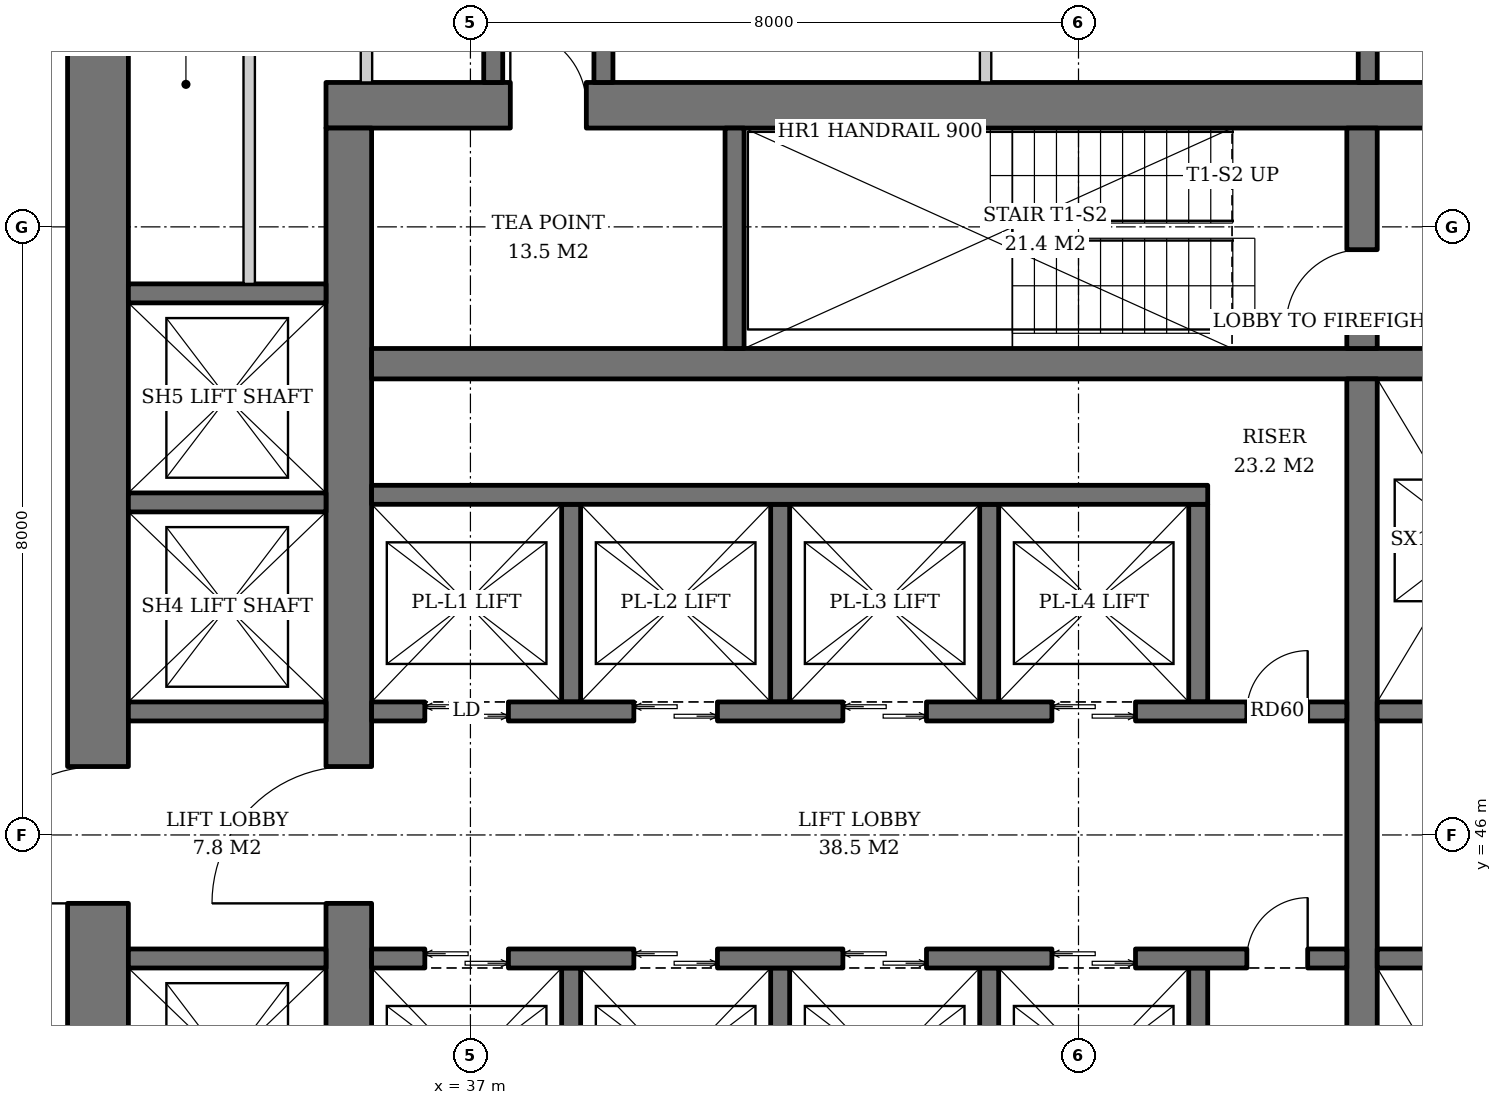
"""IFC4 building model, lengths in metres.
Left out: names, types, materials, properties, quantities, classifications, styles, units other than length and angle.
Written with IfcOpenShell. Run it as: python <this file> out.ifc"""

import sys

from ifc_helpers import new_model, si_unit, direction, frame, frame_2d, origin, place, context, subcontext, project, spatial, rectangle, extrude, element, fill, save


model = new_model("IFC4")
c1 = context("Model", 3, precision=1e-05, world=origin(), true_north=direction((0.0, 1.0)))
c2 = subcontext(c1, "Body", "Model", "MODEL_VIEW")
j1 = project(units=[si_unit("LENGTHUNIT", "METRE"), si_unit("PLANEANGLEUNIT", "RADIAN")], contexts=[c1])
p1 = place(None, origin())
s1 = spatial("IfcSite", under=j1, at=p1, CompositionType="ELEMENT")
p2 = place(p1, origin())
s2 = spatial("IfcBuilding", under=s1, at=p2, CompositionType="ELEMENT")
p3 = place(p2, frame((0.0, 0.0, 32.4)))
s3 = spatial("IfcBuildingStorey", under=s2, at=p3, CompositionType="ELEMENT", Elevation=32.4)
p4 = place(p3, frame((35.1, 55.6, 0.0), z_axis=(0.0, 0.0, 1.0), x_axis=(1.0, 0.0, 0.0)))
e1 = element("IfcWall", 1, at=p4, inside=s3, PredefinedType="SHEAR", context=c2, shape_type="SweptSolid", body=[
    extrude(rectangle(XDim=19.8, YDim=0.6, at=frame_2d((9.9, 0.0))), origin(), (0.0, 0.0, 1.0), 3.8),
])
p5 = place(p4, frame((14.54, 0.0, 0.0)))
e2 = element("IfcOpeningElement", 2, at=p5, cuts=e1, PredefinedType="OPENING", context=c2, shape_type="SweptSolid", body=[
    extrude(rectangle(XDim=1.0, YDim=2.1, at=frame_2d((0.5, 1.05))), frame((0.0, 0.31, 0.0), z_axis=(0.0, -1.0, 0.0), x_axis=(1.0, 0.0, 0.0)), (0.0, 0.0, 1.0), 0.62),
])
p6 = place(p4, frame((2.425, 0.0, 0.0)))
e3 = element("IfcOpeningElement", 3, at=p6, cuts=e1, PredefinedType="OPENING", context=c2, shape_type="SweptSolid", body=[
    extrude(rectangle(XDim=1.0, YDim=2.1, at=frame_2d((0.5, 1.05))), frame((0.0, 0.31, 0.0), z_axis=(0.0, -1.0, 0.0), x_axis=(1.0, 0.0, 0.0)), (0.0, 0.0, 1.0), 0.62),
])
p7 = place(p3, frame((35.4, 36.7, 0.0), z_axis=(0.0, 0.0, 1.0), x_axis=(0.0, 1.0, 0.0)))
e4 = element("IfcWall", 4, at=p7, inside=s3, PredefinedType="SHEAR", context=c2, shape_type="SweptSolid", body=[
    extrude(rectangle(XDim=18.6, YDim=0.6, at=frame_2d((9.3, 0.0))), origin(), (0.0, 0.0, 1.0), 3.8),
])
p8 = place(p7, frame((8.4, 0.0, 0.0)))
e5 = element("IfcOpeningElement", 5, at=p8, cuts=e4, PredefinedType="OPENING", context=c2, shape_type="SweptSolid", body=[
    extrude(rectangle(XDim=1.8, YDim=2.4, at=frame_2d((0.9, 1.2))), frame((0.0, 0.31, 0.0), z_axis=(0.0, -1.0, 0.0), x_axis=(1.0, 0.0, 0.0)), (0.0, 0.0, 1.0), 0.62),
])
p9 = place(p3, frame((32.1, 33.5, 0.0), z_axis=(0.0, 0.0, 1.0), x_axis=(0.0, 1.0, 0.0)))
e6 = element("IfcWall", 6, at=p9, inside=s3, PredefinedType="SHEAR", context=c2, shape_type="SweptSolid", body=[
    extrude(rectangle(XDim=25.0, YDim=0.8, at=frame_2d((12.5, 0.0))), origin(), (0.0, 0.0, 1.0), 3.8),
])
p10 = place(p9, frame((11.6, 0.0, 0.0)))
e7 = element("IfcOpeningElement", 7, at=p10, cuts=e6, PredefinedType="OPENING", context=c2, shape_type="SweptSolid", body=[
    extrude(rectangle(XDim=1.8, YDim=2.4, at=frame_2d((0.9, 1.2))), frame((0.0, 0.41, 0.0), z_axis=(0.0, -1.0, 0.0), x_axis=(1.0, 0.0, 0.0)), (0.0, 0.0, 1.0), 0.82),
])
p11 = place(p3, frame((35.7, 52.2, 0.0), z_axis=(0.0, 0.0, 1.0), x_axis=(1.0, 0.0, 0.0)))
e8 = element("IfcWall", 8, at=p11, inside=s3, PredefinedType="SHEAR", context=c2, shape_type="SweptSolid", body=[
    extrude(rectangle(XDim=18.6, YDim=0.4, at=frame_2d((9.3, 0.0))), origin(), (0.0, 0.0, 1.0), 3.8),
])
p12 = place(p3, frame((48.73, 40.0, 0.0), z_axis=(0.0, 0.0, 1.0), x_axis=(0.0, 1.0, 0.0)))
e9 = element("IfcWall", 9, at=p12, inside=s3, PredefinedType="SHEAR", context=c2, shape_type="SweptSolid", body=[
    extrude(rectangle(XDim=12.0, YDim=0.4, at=frame_2d((6.0, 0.0))), origin(), (0.0, 0.0, 1.0), 3.8),
])
p13 = place(p3, frame((48.73, 52.4, 0.0), z_axis=(0.0, 0.0, 1.0), x_axis=(0.0, 1.0, 0.0)))
e10 = element("IfcWall", 10, at=p13, inside=s3, PredefinedType="SHEAR", context=c2, shape_type="SweptSolid", body=[
    extrude(rectangle(XDim=2.9, YDim=0.4, at=frame_2d((1.45, 0.0))), origin(), (0.0, 0.0, 1.0), 3.8),
])
p14 = place(p13, frame((0.3, 0.0, 0.0)))
e11 = element("IfcOpeningElement", 11, at=p14, cuts=e10, PredefinedType="OPENING", context=c2, shape_type="SweptSolid", body=[
    extrude(rectangle(XDim=1.0, YDim=2.1, at=frame_2d((0.5, 1.05))), frame((0.0, 0.21, 0.0), z_axis=(0.0, -1.0, 0.0), x_axis=(1.0, 0.0, 0.0)), (0.0, 0.0, 1.0), 0.42),
])
p15 = place(p3, frame((40.475, 52.4, 0.0), z_axis=(0.0, 0.0, 1.0), x_axis=(0.0, 1.0, 0.0)))
e12 = element("IfcWall", 12, at=p15, inside=s3, PredefinedType="SHEAR", context=c2, shape_type="SweptSolid", body=[
    extrude(rectangle(XDim=2.9, YDim=0.25, at=frame_2d((1.45, 0.0))), origin(), (0.0, 0.0, 1.0), 3.8),
])
for number, where, z_axis, x_axis in (
    (13, (38.325, 47.75, 0.0), (0.0, 0.0, 1.0), (0.0, 1.0, 0.0)),
    (14, (41.075, 47.75, 0.0), (0.0, 0.0, 1.0), (0.0, 1.0, 0.0)),
    (15, (43.825, 47.75, 0.0), (0.0, 0.0, 1.0), (0.0, 1.0, 0.0)),
    (16, (46.575, 47.75, 0.0), (0.0, 0.0, 1.0), (0.0, 1.0, 0.0)),
):
    element("IfcWall", number, at=place(p3, frame(where, z_axis=z_axis, x_axis=x_axis)), inside=s3, PredefinedType="SHEAR", context=c2, shape_type="SweptSolid", body=[
        extrude(rectangle(XDim=2.6, YDim=0.25, at=frame_2d((1.3, 0.0))), origin(), (0.0, 0.0, 1.0), 3.8),
    ])
p16 = place(p3, frame((35.7, 50.475, 0.0), z_axis=(0.0, 0.0, 1.0), x_axis=(1.0, 0.0, 0.0)))
e17 = element("IfcWall", 17, at=p16, inside=s3, PredefinedType="SHEAR", context=c2, shape_type="SweptSolid", body=[
    extrude(rectangle(XDim=11.0, YDim=0.25, at=frame_2d((5.5, 0.0))), origin(), (0.0, 0.0, 1.0), 3.8),
])
p17 = place(p3, frame((35.7, 47.625, 0.0), z_axis=(0.0, 0.0, 1.0), x_axis=(1.0, 0.0, 0.0)))
e18 = element("IfcWall", 18, at=p17, inside=s3, PredefinedType="SHEAR", context=c2, shape_type="SweptSolid", body=[
    extrude(rectangle(XDim=12.83, YDim=0.25, at=frame_2d((6.415, 0.0))), origin(), (0.0, 0.0, 1.0), 3.8),
])
p18 = place(p17, frame((0.7, 0.0, 0.0)))
e19 = element("IfcOpeningElement", 19, at=p18, cuts=e18, PredefinedType="OPENING", context=c2, shape_type="SweptSolid", body=[
    extrude(rectangle(XDim=1.1, YDim=2.2, at=frame_2d((0.55, 1.1))), frame((0.0, 0.135, 0.0), z_axis=(0.0, -1.0, 0.0), x_axis=(1.0, 0.0, 0.0)), (0.0, 0.0, 1.0), 0.27),
])
p19 = place(p17, frame((3.45, 0.0, 0.0)))
e20 = element("IfcOpeningElement", 20, at=p19, cuts=e18, PredefinedType="OPENING", context=c2, shape_type="SweptSolid", body=[
    extrude(rectangle(XDim=1.1, YDim=2.2, at=frame_2d((0.55, 1.1))), frame((0.0, 0.135, 0.0), z_axis=(0.0, -1.0, 0.0), x_axis=(1.0, 0.0, 0.0)), (0.0, 0.0, 1.0), 0.27),
])
p20 = place(p17, frame((6.2, 0.0, 0.0)))
e21 = element("IfcOpeningElement", 21, at=p20, cuts=e18, PredefinedType="OPENING", context=c2, shape_type="SweptSolid", body=[
    extrude(rectangle(XDim=1.1, YDim=2.2, at=frame_2d((0.55, 1.1))), frame((0.0, 0.135, 0.0), z_axis=(0.0, -1.0, 0.0), x_axis=(1.0, 0.0, 0.0)), (0.0, 0.0, 1.0), 0.27),
])
p21 = place(p17, frame((8.95, 0.0, 0.0)))
e22 = element("IfcOpeningElement", 22, at=p21, cuts=e18, PredefinedType="OPENING", context=c2, shape_type="SweptSolid", body=[
    extrude(rectangle(XDim=1.1, YDim=2.2, at=frame_2d((0.55, 1.1))), frame((0.0, 0.135, 0.0), z_axis=(0.0, -1.0, 0.0), x_axis=(1.0, 0.0, 0.0)), (0.0, 0.0, 1.0), 0.27),
])
p22 = place(p17, frame((11.515, 0.0, 0.0)))
e23 = element("IfcOpeningElement", 23, at=p22, cuts=e18, PredefinedType="OPENING", context=c2, shape_type="SweptSolid", body=[
    extrude(rectangle(XDim=0.8, YDim=2.0, at=frame_2d((0.4, 1.0))), frame((0.0, 0.135, 0.0), z_axis=(0.0, -1.0, 0.0), x_axis=(1.0, 0.0, 0.0)), (0.0, 0.0, 1.0), 0.27),
])
for number, where, z_axis, x_axis in (
    (24, (38.325, 44.25, 0.0), (0.0, 0.0, 1.0), (0.0, -1.0, 0.0)),
    (25, (41.075, 44.25, 0.0), (0.0, 0.0, 1.0), (0.0, -1.0, 0.0)),
    (26, (43.825, 44.25, 0.0), (0.0, 0.0, 1.0), (0.0, -1.0, 0.0)),
    (27, (46.575, 44.25, 0.0), (0.0, 0.0, 1.0), (0.0, -1.0, 0.0)),
):
    element("IfcWall", number, at=place(p3, frame(where, z_axis=z_axis, x_axis=x_axis)), inside=s3, PredefinedType="SHEAR", context=c2, shape_type="SweptSolid", body=[
        extrude(rectangle(XDim=2.6, YDim=0.25, at=frame_2d((1.3, 0.0))), origin(), (0.0, 0.0, 1.0), 3.8),
    ])
p23 = place(p3, frame((35.7, 44.375, 0.0), z_axis=(0.0, 0.0, 1.0), x_axis=(1.0, 0.0, 0.0)))
e28 = element("IfcWall", 28, at=p23, inside=s3, PredefinedType="SHEAR", context=c2, shape_type="SweptSolid", body=[
    extrude(rectangle(XDim=12.83, YDim=0.25, at=frame_2d((6.415, 0.0))), origin(), (0.0, 0.0, 1.0), 3.8),
])
p24 = place(p23, frame((0.7, 0.0, 0.0)))
e29 = element("IfcOpeningElement", 29, at=p24, cuts=e28, PredefinedType="OPENING", context=c2, shape_type="SweptSolid", body=[
    extrude(rectangle(XDim=1.1, YDim=2.2, at=frame_2d((0.55, 1.1))), frame((0.0, 0.135, 0.0), z_axis=(0.0, -1.0, 0.0), x_axis=(1.0, 0.0, 0.0)), (0.0, 0.0, 1.0), 0.27),
])
p25 = place(p23, frame((3.45, 0.0, 0.0)))
e30 = element("IfcOpeningElement", 30, at=p25, cuts=e28, PredefinedType="OPENING", context=c2, shape_type="SweptSolid", body=[
    extrude(rectangle(XDim=1.1, YDim=2.2, at=frame_2d((0.55, 1.1))), frame((0.0, 0.135, 0.0), z_axis=(0.0, -1.0, 0.0), x_axis=(1.0, 0.0, 0.0)), (0.0, 0.0, 1.0), 0.27),
])
p26 = place(p23, frame((6.2, 0.0, 0.0)))
e31 = element("IfcOpeningElement", 31, at=p26, cuts=e28, PredefinedType="OPENING", context=c2, shape_type="SweptSolid", body=[
    extrude(rectangle(XDim=1.1, YDim=2.2, at=frame_2d((0.55, 1.1))), frame((0.0, 0.135, 0.0), z_axis=(0.0, -1.0, 0.0), x_axis=(1.0, 0.0, 0.0)), (0.0, 0.0, 1.0), 0.27),
])
p27 = place(p23, frame((8.95, 0.0, 0.0)))
e32 = element("IfcOpeningElement", 32, at=p27, cuts=e28, PredefinedType="OPENING", context=c2, shape_type="SweptSolid", body=[
    extrude(rectangle(XDim=1.1, YDim=2.2, at=frame_2d((0.55, 1.1))), frame((0.0, 0.135, 0.0), z_axis=(0.0, -1.0, 0.0), x_axis=(1.0, 0.0, 0.0)), (0.0, 0.0, 1.0), 0.27),
])
p28 = place(p23, frame((11.515, 0.0, 0.0)))
e33 = element("IfcOpeningElement", 33, at=p28, cuts=e28, PredefinedType="OPENING", context=c2, shape_type="SweptSolid", body=[
    extrude(rectangle(XDim=0.8, YDim=2.0, at=frame_2d((0.4, 1.0))), frame((0.0, 0.135, 0.0), z_axis=(0.0, -1.0, 0.0), x_axis=(1.0, 0.0, 0.0)), (0.0, 0.0, 1.0), 0.27),
])
for number, where, z_axis, x_axis in (
    (34, (48.93, 47.625, 0.0), (0.0, 0.0, 1.0), (1.0, 0.0, 0.0)),
    (35, (48.93, 44.375, 0.0), (0.0, 0.0, 1.0), (1.0, 0.0, 0.0)),
):
    element("IfcWall", number, at=place(p3, frame(where, z_axis=z_axis, x_axis=x_axis)), inside=s3, PredefinedType="SHEAR", context=c2, shape_type="SweptSolid", body=[
        extrude(rectangle(XDim=5.37, YDim=0.25, at=frame_2d((2.685, 0.0))), origin(), (0.0, 0.0, 1.0), 3.8),
    ])
for number, where, z_axis, x_axis in (
    (36, (32.5, 44.375, 0.0), (0.0, 0.0, 1.0), (1.0, 0.0, 0.0)),
    (37, (32.5, 47.625, 0.0), (0.0, 0.0, 1.0), (1.0, 0.0, 0.0)),
    (38, (32.5, 50.375, 0.0), (0.0, 0.0, 1.0), (1.0, 0.0, 0.0)),
    (39, (32.5, 53.125, 0.0), (0.0, 0.0, 1.0), (1.0, 0.0, 0.0)),
):
    element("IfcWall", number, at=place(p3, frame(where, z_axis=z_axis, x_axis=x_axis)), inside=s3, PredefinedType="SHEAR", context=c2, shape_type="SweptSolid", body=[
        extrude(rectangle(XDim=2.6, YDim=0.25, at=frame_2d((1.3, 0.0))), origin(), (0.0, 0.0, 1.0), 3.8),
    ])
for number, where, z_axis, x_axis in (
    (40, (48.805, 55.9, 0.0), (0.0, 0.0, 1.0), (0.0, 1.0, 0.0)),
    (41, (37.3, 55.9, 0.0), (0.0, 0.0, 1.0), (0.0, 1.0, 0.0)),
    (42, (38.75, 55.9, 0.0), (0.0, 0.0, 1.0), (0.0, 1.0, 0.0)),
):
    element("IfcWall", number, at=place(p3, frame(where, z_axis=z_axis, x_axis=x_axis)), inside=s3, PredefinedType="SOLIDWALL", context=c2, shape_type="SweptSolid", body=[
        extrude(rectangle(XDim=2.6, YDim=0.25, at=frame_2d((1.3, 0.0))), origin(), (0.0, 0.0, 1.0), 3.62),
    ])
p29 = place(p3, frame((34.09, 53.25, 0.0), z_axis=(0.0, 0.0, 1.0), x_axis=(0.0, 1.0, 0.0)))
e43 = element("IfcWall", 43, at=p29, inside=s3, PredefinedType="SOLIDWALL", context=c2, shape_type="SweptSolid", body=[
    extrude(rectangle(XDim=5.25, YDim=0.15, at=frame_2d((2.625, 0.0))), origin(), (0.0, 0.0, 1.0), 3.62),
])
for number, where, z_axis, x_axis in (
    (44, (35.632, 55.9, 0.0), (0.0, 0.0, 1.0), (0.0, 1.0, 0.0)),
    (45, (43.778, 55.9, 0.0), (0.0, 0.0, 1.0), (0.0, 1.0, 0.0)),
):
    element("IfcWall", number, at=place(p3, frame(where, z_axis=z_axis, x_axis=x_axis)), inside=s3, PredefinedType="SOLIDWALL", context=c2, shape_type="SweptSolid", body=[
        extrude(rectangle(XDim=2.6, YDim=0.15, at=frame_2d((1.3, 0.0))), origin(), (0.0, 0.0, 1.0), 3.62),
    ])
p30 = place(p18, origin())
e46 = element("IfcDoor", 46, at=p30, inside=s3, OperationType="DOUBLE_DOOR_SLIDING", PredefinedType="DOOR", context=c2, shape_type="SweptSolid", body=[
    extrude(rectangle(XDim=1.1, YDim=2.2, at=frame_2d((0.55, 1.1))), frame((0.0, 0.025, 0.0), z_axis=(0.0, -1.0, 0.0), x_axis=(1.0, 0.0, 0.0)), (0.0, 0.0, 1.0), 0.05),
])
fill(e19, e46)
p31 = place(p19, origin())
e47 = element("IfcDoor", 47, at=p31, inside=s3, OperationType="DOUBLE_DOOR_SLIDING", PredefinedType="DOOR", context=c2, shape_type="SweptSolid", body=[
    extrude(rectangle(XDim=1.1, YDim=2.2, at=frame_2d((0.55, 1.1))), frame((0.0, 0.025, 0.0), z_axis=(0.0, -1.0, 0.0), x_axis=(1.0, 0.0, 0.0)), (0.0, 0.0, 1.0), 0.05),
])
fill(e20, e47)
p32 = place(p20, origin())
e48 = element("IfcDoor", 48, at=p32, inside=s3, OperationType="DOUBLE_DOOR_SLIDING", PredefinedType="DOOR", context=c2, shape_type="SweptSolid", body=[
    extrude(rectangle(XDim=1.1, YDim=2.2, at=frame_2d((0.55, 1.1))), frame((0.0, 0.025, 0.0), z_axis=(0.0, -1.0, 0.0), x_axis=(1.0, 0.0, 0.0)), (0.0, 0.0, 1.0), 0.05),
])
fill(e21, e48)
p33 = place(p21, origin())
e49 = element("IfcDoor", 49, at=p33, inside=s3, OperationType="DOUBLE_DOOR_SLIDING", PredefinedType="DOOR", context=c2, shape_type="SweptSolid", body=[
    extrude(rectangle(XDim=1.1, YDim=2.2, at=frame_2d((0.55, 1.1))), frame((0.0, 0.025, 0.0), z_axis=(0.0, -1.0, 0.0), x_axis=(1.0, 0.0, 0.0)), (0.0, 0.0, 1.0), 0.05),
])
fill(e22, e49)
p34 = place(p22, origin())
e50 = element("IfcDoor", 50, at=p34, inside=s3, OperationType="SINGLE_SWING_RIGHT", PredefinedType="DOOR", context=c2, shape_type="SweptSolid", body=[
    extrude(rectangle(XDim=0.8, YDim=2.0, at=frame_2d((0.4, 1.0))), frame((0.0, 0.025, 0.0), z_axis=(0.0, -1.0, 0.0), x_axis=(1.0, 0.0, 0.0)), (0.0, 0.0, 1.0), 0.05),
])
fill(e23, e50)
p35 = place(p24, origin())
e51 = element("IfcDoor", 51, at=p35, inside=s3, OperationType="DOUBLE_DOOR_SLIDING", PredefinedType="DOOR", context=c2, shape_type="SweptSolid", body=[
    extrude(rectangle(XDim=1.1, YDim=2.2, at=frame_2d((0.55, 1.1))), frame((0.0, 0.025, 0.0), z_axis=(0.0, -1.0, 0.0), x_axis=(1.0, 0.0, 0.0)), (0.0, 0.0, 1.0), 0.05),
])
fill(e29, e51)
p36 = place(p25, origin())
e52 = element("IfcDoor", 52, at=p36, inside=s3, OperationType="DOUBLE_DOOR_SLIDING", PredefinedType="DOOR", context=c2, shape_type="SweptSolid", body=[
    extrude(rectangle(XDim=1.1, YDim=2.2, at=frame_2d((0.55, 1.1))), frame((0.0, 0.025, 0.0), z_axis=(0.0, -1.0, 0.0), x_axis=(1.0, 0.0, 0.0)), (0.0, 0.0, 1.0), 0.05),
])
fill(e30, e52)
p37 = place(p26, origin())
e53 = element("IfcDoor", 53, at=p37, inside=s3, OperationType="DOUBLE_DOOR_SLIDING", PredefinedType="DOOR", context=c2, shape_type="SweptSolid", body=[
    extrude(rectangle(XDim=1.1, YDim=2.2, at=frame_2d((0.55, 1.1))), frame((0.0, 0.025, 0.0), z_axis=(0.0, -1.0, 0.0), x_axis=(1.0, 0.0, 0.0)), (0.0, 0.0, 1.0), 0.05),
])
fill(e31, e53)
p38 = place(p27, origin())
e54 = element("IfcDoor", 54, at=p38, inside=s3, OperationType="DOUBLE_DOOR_SLIDING", PredefinedType="DOOR", context=c2, shape_type="SweptSolid", body=[
    extrude(rectangle(XDim=1.1, YDim=2.2, at=frame_2d((0.55, 1.1))), frame((0.0, 0.025, 0.0), z_axis=(0.0, -1.0, 0.0), x_axis=(1.0, 0.0, 0.0)), (0.0, 0.0, 1.0), 0.05),
])
fill(e32, e54)
p39 = place(p28, origin())
e55 = element("IfcDoor", 55, at=p39, inside=s3, OperationType="SINGLE_SWING_RIGHT", PredefinedType="DOOR", context=c2, shape_type="SweptSolid", body=[
    extrude(rectangle(XDim=0.8, YDim=2.0, at=frame_2d((0.4, 1.0))), frame((0.0, 0.025, 0.0), z_axis=(0.0, -1.0, 0.0), x_axis=(1.0, 0.0, 0.0)), (0.0, 0.0, 1.0), 0.05),
])
fill(e33, e55)
p40 = place(p14, origin())
e56 = element("IfcDoor", 56, at=p40, inside=s3, OperationType="SINGLE_SWING_LEFT", PredefinedType="DOOR", context=c2, shape_type="SweptSolid", body=[
    extrude(rectangle(XDim=1.0, YDim=2.1, at=frame_2d((0.5, 1.05))), frame((0.0, 0.025, 0.0), z_axis=(0.0, -1.0, 0.0), x_axis=(1.0, 0.0, 0.0)), (0.0, 0.0, 1.0), 0.05),
])
fill(e11, e56)
p41 = place(p8, origin())
e57 = element("IfcDoor", 57, at=p41, inside=s3, OperationType="DOUBLE_DOOR_SINGLE_SWING", PredefinedType="DOOR", context=c2, shape_type="SweptSolid", body=[
    extrude(rectangle(XDim=1.8, YDim=2.4, at=frame_2d((0.9, 1.2))), frame((0.0, 0.025, 0.0), z_axis=(0.0, -1.0, 0.0), x_axis=(1.0, 0.0, 0.0)), (0.0, 0.0, 1.0), 0.05),
])
fill(e5, e57)
p42 = place(p10, origin())
e58 = element("IfcDoor", 58, at=p42, inside=s3, OperationType="DOUBLE_DOOR_SINGLE_SWING", PredefinedType="DOOR", context=c2, shape_type="SweptSolid", body=[
    extrude(rectangle(XDim=1.8, YDim=2.4, at=frame_2d((0.9, 1.2))), frame((0.0, 0.025, 0.0), z_axis=(0.0, -1.0, 0.0), x_axis=(1.0, 0.0, 0.0)), (0.0, 0.0, 1.0), 0.05),
])
fill(e7, e58)
p43 = place(p6, origin())
e59 = element("IfcDoor", 59, at=p43, inside=s3, OperationType="SINGLE_SWING_LEFT", PredefinedType="DOOR", context=c2, shape_type="SweptSolid", body=[
    extrude(rectangle(XDim=1.0, YDim=2.1, at=frame_2d((0.5, 1.05))), frame((0.0, -0.24, 0.0), z_axis=(0.0, -1.0, 0.0), x_axis=(1.0, 0.0, 0.0)), (0.0, 0.0, 1.0), 0.05),
])
fill(e3, e59)
save(model, sys.argv[1])
